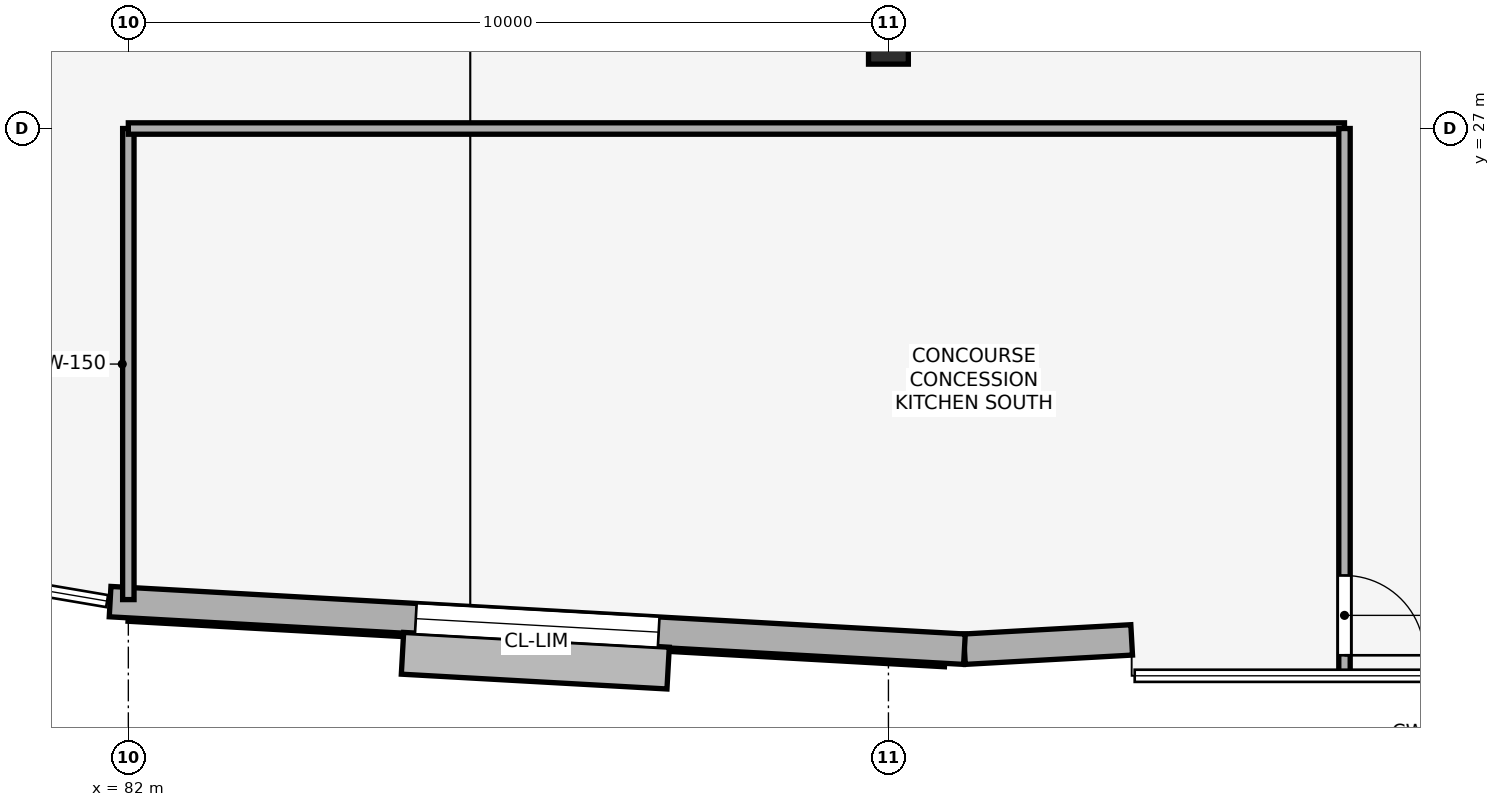
"""IFC4 building model, lengths in metres.
Left out: names, types, materials, properties, quantities, classifications, styles, units other than length and angle.
Written with IfcOpenShell. Run it as: python <this file> out.ifc"""

import sys

from ifc_helpers import new_model, si_unit, direction, frame, frame_2d, origin, origin_2d, place, context, subcontext, project, spatial, rectangle, i_section, extrude, element, fill, save


model = new_model("IFC4")
c1 = context("Model", 3, precision=1e-05, world=origin(), true_north=direction((0.0, 1.0)))
c2 = subcontext(c1, "Body", "Model", "MODEL_VIEW")
j1 = project(units=[si_unit("LENGTHUNIT", "METRE"), si_unit("PLANEANGLEUNIT", "RADIAN")], contexts=[c1])
p1 = place(None, origin())
s1 = spatial("IfcSite", under=j1, at=p1, CompositionType="ELEMENT")
p2 = place(p1, origin())
s2 = spatial("IfcBuilding", under=s1, at=p2, CompositionType="ELEMENT")
p3 = place(p2, frame((0.0, 0.0, 5.4)))
s3 = spatial("IfcBuildingStorey", under=s2, at=p3, CompositionType="ELEMENT", Elevation=5.4)
p4 = place(p3, frame((92.0, 28.0, 0.0), z_axis=(0.0, 0.0, 1.0), x_axis=(0.0, -1.0, 0.0)))
e1 = element("IfcColumn", 1, at=p4, inside=s3, PredefinedType="COLUMN", context=c2, shape_type="SweptSolid", body=[
    extrude(i_section(OverallWidth=0.306, OverallDepth=0.524, WebThickness=0.021, FlangeThickness=0.04, FilletRadius=0.027, at=origin_2d()), origin(), (0.0, 0.0, 1.0), 4.8),
])
p5 = place(p3, frame((95.2, 20.272, 0.0), z_axis=(0.0, 0.0, 1.0), x_axis=(-0.99845181806, -0.055623439426, 0.0)))
e2 = element("IfcWall", 2, at=p5, inside=s3, PredefinedType="STANDARD", context=c2, shape_type="SweptSolid", body=[
    extrude(rectangle(XDim=2.203, YDim=0.4, at=frame_2d((1.102, 0.0))), origin(), (0.0, 0.0, 1.0), 4.52),
])
p6 = place(p3, frame((93.0, 20.15, 0.0), z_axis=(0.0, 0.0, 1.0), x_axis=(-0.998452736481, 0.055606951135, 0.0)))
e3 = element("IfcWall", 3, at=p6, inside=s3, PredefinedType="STANDARD", context=c2, shape_type="SweptSolid", body=[
    extrude(rectangle(XDim=11.257, YDim=0.4, at=frame_2d((5.628, 0.0))), origin(), (0.0, 0.0, 1.0), 4.52),
])
p7 = place(p6, frame((4.029, 0.0, 0.95)))
e4 = element("IfcOpeningElement", 4, at=p7, cuts=e3, PredefinedType="OPENING", context=c2, shape_type="SweptSolid", body=[
    extrude(rectangle(XDim=3.2, YDim=1.8, at=frame_2d((1.6, 0.9))), frame((0.0, 0.21, 0.0), z_axis=(0.0, -1.0, 0.0), x_axis=(1.0, 0.0, 0.0)), (0.0, 0.0, 1.0), 0.42),
])
p8 = place(p3, frame((82.0, 20.802, 0.0), z_axis=(0.0, 0.0, 1.0), x_axis=(0.0, 1.0, 0.0)))
e5 = element("IfcWall", 5, at=p8, inside=s3, PredefinedType="PARTITIONING", context=c2, shape_type="SweptSolid", body=[
    extrude(rectangle(XDim=6.198, YDim=0.15, at=frame_2d((3.099, 0.0))), origin(), (0.0, 0.0, 1.0), 4.52),
])
p9 = place(p3, frame((82.0, 27.0, 0.0), z_axis=(0.0, 0.0, 1.0), x_axis=(1.0, 0.0, 0.0)))
e6 = element("IfcWall", 6, at=p9, inside=s3, PredefinedType="PARTITIONING", context=c2, shape_type="SweptSolid", body=[
    extrude(rectangle(XDim=16.0, YDim=0.15, at=frame_2d((8.0, 0.0))), origin(), (0.0, 0.0, 1.0), 3.515),
])
p10 = place(p3, frame((98.0, 27.0, 0.0), z_axis=(0.0, 0.0, 1.0), x_axis=(0.0, -1.0, 0.0)))
e7 = element("IfcWall", 7, at=p10, inside=s3, PredefinedType="PARTITIONING", context=c2, shape_type="SweptSolid", body=[
    extrude(rectangle(XDim=7.18, YDim=0.15, at=frame_2d((3.59, 0.0))), origin(), (0.0, 0.0, 1.0), 4.52),
])
p11 = place(p10, frame((5.88, 0.0, 0.0)))
e8 = element("IfcOpeningElement", 8, at=p11, cuts=e7, PredefinedType="OPENING", context=c2, shape_type="SweptSolid", body=[
    extrude(rectangle(XDim=1.05, YDim=2.15, at=frame_2d((0.525, 1.075))), frame((0.0, 0.085, 0.0), z_axis=(0.0, -1.0, 0.0), x_axis=(1.0, 0.0, 0.0)), (0.0, 0.0, 1.0), 0.17),
])
p12 = place(p7, origin())
e9 = element("IfcWindow", 9, at=p12, inside=s3, PartitioningType="SINGLE_PANEL", PredefinedType="WINDOW", context=c2, shape_type="SweptSolid", body=[
    extrude(rectangle(XDim=3.2, YDim=1.8, at=frame_2d((1.6, 0.9))), frame((0.0, 0.03, 0.0), z_axis=(0.0, -1.0, 0.0), x_axis=(1.0, 0.0, 0.0)), (0.0, 0.0, 1.0), 0.06),
])
fill(e4, e9)
p13 = place(p11, origin())
e10 = element("IfcDoor", 10, at=p13, inside=s3, OperationType="SINGLE_SWING_RIGHT", PredefinedType="DOOR", context=c2, shape_type="SweptSolid", body=[
    extrude(rectangle(XDim=1.05, YDim=2.15, at=frame_2d((0.525, 1.075))), frame((0.0, 0.025, 0.0), z_axis=(0.0, -1.0, 0.0), x_axis=(1.0, 0.0, 0.0)), (0.0, 0.0, 1.0), 0.05),
])
fill(e8, e10)
save(model, sys.argv[1])
